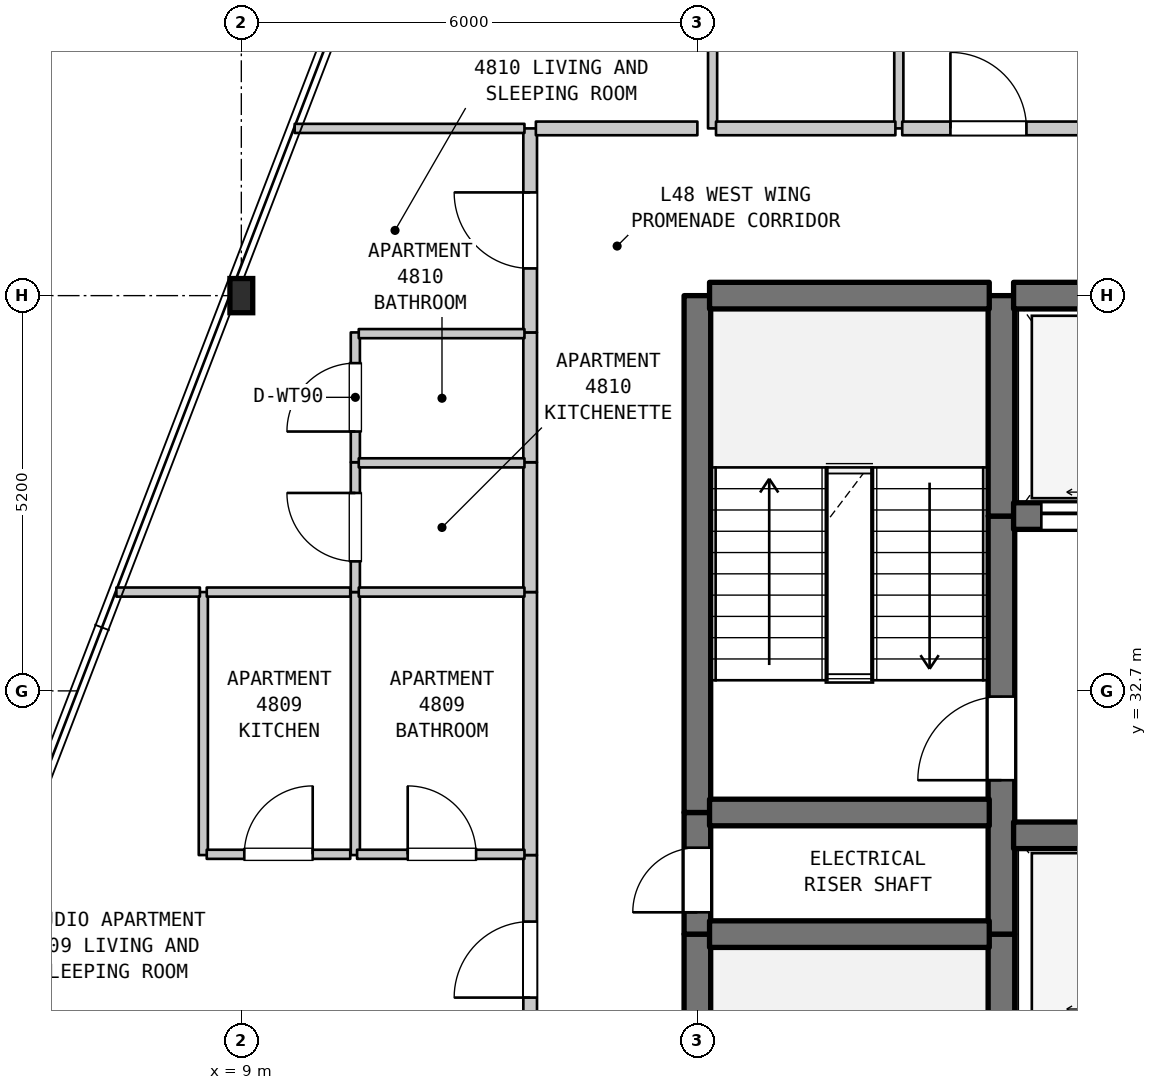
"""IFC4 building model, lengths in metres.
Left out: names, types, materials, properties, quantities, classifications, styles, units other than length and angle.
Written with IfcOpenShell. Run it as: python <this file> out.ifc"""

import sys

from ifc_helpers import new_model, si_unit, direction, frame, frame_2d, origin, origin_2d, place, context, subcontext, project, spatial, rectangle, i_section, extrude, element, fill, save


model = new_model("IFC4")
c1 = context("Model", 3, precision=1e-05, world=origin(), true_north=direction((0.0, 1.0)))
c2 = subcontext(c1, "Body", "Model", "MODEL_VIEW")
j1 = project(units=[si_unit("LENGTHUNIT", "METRE"), si_unit("PLANEANGLEUNIT", "RADIAN")], contexts=[c1])
p1 = place(None, origin())
s1 = spatial("IfcSite", under=j1, at=p1, CompositionType="ELEMENT")
p2 = place(p1, origin())
s2 = spatial("IfcBuilding", under=s1, at=p2, CompositionType="ELEMENT")
p3 = place(p2, frame((0.0, 0.0, 195.8)))
s3 = spatial("IfcBuildingStorey", under=s2, at=p3, CompositionType="ELEMENT", Elevation=195.8)
p4 = place(p3, frame((9.0, 37.9, 0.0), z_axis=(0.0, 0.0, 1.0), x_axis=(1.0, 0.0, 0.0)))
e1 = element("IfcColumn", 1, at=p4, inside=s3, PredefinedType="COLUMN", context=c2, shape_type="SweptSolid", body=[
    extrude(i_section(OverallWidth=0.3, OverallDepth=0.45, WebThickness=0.014, FlangeThickness=0.026, FilletRadius=0.027, at=origin_2d()), origin(), (0.0, 0.0, 1.0), 3.7),
])
for number, where, z_axis, x_axis in (
    (2, (8.5, 30.54, 0.0), (0.0, 0.0, 1.0), (0.0, 1.0, 0.0)),
    (3, (10.5, 30.54, 0.0), (0.0, 0.0, 1.0), (0.0, 1.0, 0.0)),
):
    element("IfcWall", number, at=place(p3, frame(where, z_axis=z_axis, x_axis=x_axis)), inside=s3, PredefinedType="PARTITIONING", context=c2, shape_type="SweptSolid", body=[
        extrude(rectangle(XDim=3.46, YDim=0.12, at=frame_2d((1.73, 0.0))), origin(), (0.0, 0.0, 1.0), 3.39),
    ])
p5 = place(p3, frame((10.5, 34.0, 0.0), z_axis=(0.0, 0.0, 1.0), x_axis=(0.0, 1.0, 0.0)))
e4 = element("IfcWall", 4, at=p5, inside=s3, PredefinedType="PARTITIONING", context=c2, shape_type="SweptSolid", body=[
    extrude(rectangle(XDim=1.708, YDim=0.12, at=frame_2d((0.854, 0.0))), origin(), (0.0, 0.0, 1.0), 3.39),
])
p6 = place(p5, frame((0.404, 0.0, 0.0)))
e5 = element("IfcOpeningElement", 5, at=p6, cuts=e4, PredefinedType="OPENING", context=c2, shape_type="SweptSolid", body=[
    extrude(rectangle(XDim=0.9, YDim=2.15, at=frame_2d((0.45, 1.075))), frame((0.0, 0.07, 0.0), z_axis=(0.0, -1.0, 0.0), x_axis=(1.0, 0.0, 0.0)), (0.0, 0.0, 1.0), 0.14),
])
p7 = place(p3, frame((10.5, 35.708, 0.0), z_axis=(0.0, 0.0, 1.0), x_axis=(0.0, 1.0, 0.0)))
e6 = element("IfcWall", 6, at=p7, inside=s3, PredefinedType="PARTITIONING", context=c2, shape_type="SweptSolid", body=[
    extrude(rectangle(XDim=1.708, YDim=0.12, at=frame_2d((0.854, 0.0))), origin(), (0.0, 0.0, 1.0), 3.39),
])
p8 = place(p7, frame((0.404, 0.0, 0.0)))
e7 = element("IfcOpeningElement", 7, at=p8, cuts=e6, PredefinedType="OPENING", context=c2, shape_type="SweptSolid", body=[
    extrude(rectangle(XDim=0.9, YDim=2.1, at=frame_2d((0.45, 1.05))), frame((0.0, 0.07, 0.0), z_axis=(0.0, -1.0, 0.0), x_axis=(1.0, 0.0, 0.0)), (0.0, 0.0, 1.0), 0.14),
])
p9 = place(p3, frame((12.8, 27.79, 0.0), z_axis=(0.0, 0.0, 1.0), x_axis=(0.0, 1.0, 0.0)))
e8 = element("IfcWall", 8, at=p9, inside=s3, PredefinedType="STANDARD", context=c2, shape_type="SweptSolid", body=[
    extrude(rectangle(XDim=2.75, YDim=0.18, at=frame_2d((1.375, 0.0))), origin(), (0.0, 0.0, 1.0), 3.39),
])
p10 = place(p9, frame((0.875, 0.0, 0.0)))
e9 = element("IfcOpeningElement", 9, at=p10, cuts=e8, PredefinedType="OPENING", context=c2, shape_type="SweptSolid", body=[
    extrude(rectangle(XDim=1.0, YDim=2.15, at=frame_2d((0.5, 1.075))), frame((0.0, 0.1, 0.0), z_axis=(0.0, -1.0, 0.0), x_axis=(1.0, 0.0, 0.0)), (0.0, 0.0, 1.0), 0.2),
])
p11 = place(p3, frame((12.8, 30.54, 0.0), z_axis=(0.0, 0.0, 1.0), x_axis=(0.0, 1.0, 0.0)))
e10 = element("IfcWall", 10, at=p11, inside=s3, PredefinedType="STANDARD", context=c2, shape_type="SweptSolid", body=[
    extrude(rectangle(XDim=3.46, YDim=0.18, at=frame_2d((1.73, 0.0))), origin(), (0.0, 0.0, 1.0), 3.39),
])
for number, where, z_axis, x_axis in (
    (11, (12.8, 34.0, 0.0), (0.0, 0.0, 1.0), (0.0, 1.0, 0.0)),
    (12, (12.8, 35.708, 0.0), (0.0, 0.0, 1.0), (0.0, 1.0, 0.0)),
):
    element("IfcWall", number, at=place(p3, frame(where, z_axis=z_axis, x_axis=x_axis)), inside=s3, PredefinedType="STANDARD", context=c2, shape_type="SweptSolid", body=[
        extrude(rectangle(XDim=1.708, YDim=0.18, at=frame_2d((0.854, 0.0))), origin(), (0.0, 0.0, 1.0), 3.39),
    ])
p12 = place(p3, frame((12.8, 37.416, 0.0), z_axis=(0.0, 0.0, 1.0), x_axis=(0.0, 1.0, 0.0)))
e13 = element("IfcWall", 13, at=p12, inside=s3, PredefinedType="STANDARD", context=c2, shape_type="SweptSolid", body=[
    extrude(rectangle(XDim=2.684, YDim=0.18, at=frame_2d((1.342, 0.0))), origin(), (0.0, 0.0, 1.0), 3.39),
])
p13 = place(p12, frame((0.842, 0.0, 0.0)))
e14 = element("IfcOpeningElement", 14, at=p13, cuts=e13, PredefinedType="OPENING", context=c2, shape_type="SweptSolid", body=[
    extrude(rectangle(XDim=1.0, YDim=2.15, at=frame_2d((0.5, 1.075))), frame((0.0, 0.1, 0.0), z_axis=(0.0, -1.0, 0.0), x_axis=(1.0, 0.0, 0.0)), (0.0, 0.0, 1.0), 0.2),
])
p14 = place(p3, frame((15.0, 22.7, 0.0), z_axis=(0.0, 0.0, 1.0), x_axis=(0.0, 1.0, 0.0)))
e15 = element("IfcWall", 15, at=p14, inside=s3, PredefinedType="SHEAR", context=c2, shape_type="SweptSolid", body=[
    extrude(rectangle(XDim=6.8, YDim=0.35, at=frame_2d((3.4, 0.0))), origin(), (0.0, 0.0, 1.0), 3.39),
])
p15 = place(p3, frame((15.0, 29.5, 0.0), z_axis=(0.0, 0.0, 1.0), x_axis=(0.0, 1.0, 0.0)))
e16 = element("IfcWall", 16, at=p15, inside=s3, PredefinedType="SHEAR", context=c2, shape_type="SweptSolid", body=[
    extrude(rectangle(XDim=1.6, YDim=0.35, at=frame_2d((0.8, 0.0))), origin(), (0.0, 0.0, 1.0), 3.39),
])
p16 = place(p15, frame((0.287, 0.0, 0.0)))
e17 = element("IfcOpeningElement", 17, at=p16, cuts=e16, PredefinedType="OPENING", context=c2, shape_type="SweptSolid", body=[
    extrude(rectangle(XDim=0.85, YDim=2.1, at=frame_2d((0.425, 1.05))), frame((0.0, 0.185, 0.0), z_axis=(0.0, -1.0, 0.0), x_axis=(1.0, 0.0, 0.0)), (0.0, 0.0, 1.0), 0.37),
])
p17 = place(p3, frame((15.0, 31.1, 0.0), z_axis=(0.0, 0.0, 1.0), x_axis=(0.0, 1.0, 0.0)))
e18 = element("IfcWall", 18, at=p17, inside=s3, PredefinedType="SHEAR", context=c2, shape_type="SweptSolid", body=[
    extrude(rectangle(XDim=6.8, YDim=0.35, at=frame_2d((3.4, 0.0))), origin(), (0.0, 0.0, 1.0), 3.39),
])
p18 = place(p3, frame((15.2, 40.1, 0.0), z_axis=(0.0, 0.0, 1.0), x_axis=(0.0, 1.0, 0.0)))
e19 = element("IfcWall", 19, at=p18, inside=s3, PredefinedType="PARTITIONING", context=c2, shape_type="SweptSolid", body=[
    extrude(rectangle(XDim=3.2, YDim=0.12, at=frame_2d((1.6, 0.0))), origin(), (0.0, 0.0, 1.0), 3.39),
])
p19 = place(p3, frame((17.65, 40.1, 0.0), z_axis=(0.0, 0.0, 1.0), x_axis=(0.0, 1.0, 0.0)))
e20 = element("IfcWall", 20, at=p19, inside=s3, PredefinedType="PARTITIONING", context=c2, shape_type="SweptSolid", body=[
    extrude(rectangle(XDim=3.2, YDim=0.12, at=frame_2d((1.6, 0.0))), origin(), (0.0, 0.0, 1.0), 3.39),
])
p20 = place(p19, frame((1.15, 0.0, 0.0)))
e21 = element("IfcOpeningElement", 21, at=p20, cuts=e20, PredefinedType="OPENING", context=c2, shape_type="SweptSolid", body=[
    extrude(rectangle(XDim=0.9, YDim=2.15, at=frame_2d((0.45, 1.075))), frame((0.0, 0.07, 0.0), z_axis=(0.0, -1.0, 0.0), x_axis=(1.0, 0.0, 0.0)), (0.0, 0.0, 1.0), 0.14),
])
p21 = place(p3, frame((19.0, 28.2, 0.0), z_axis=(0.0, 0.0, 1.0), x_axis=(0.0, 1.0, 0.0)))
e22 = element("IfcWall", 22, at=p21, inside=s3, PredefinedType="SHEAR", context=c2, shape_type="SweptSolid", body=[
    extrude(rectangle(XDim=1.3, YDim=0.35, at=frame_2d((0.65, 0.0))), origin(), (0.0, 0.0, 1.0), 3.39),
])
p22 = place(p3, frame((19.0, 29.5, 0.0), z_axis=(0.0, 0.0, 1.0), x_axis=(0.0, 1.0, 0.0)))
e23 = element("IfcWall", 23, at=p22, inside=s3, PredefinedType="SHEAR", context=c2, shape_type="SweptSolid", body=[
    extrude(rectangle(XDim=5.5, YDim=0.35, at=frame_2d((2.75, 0.0))), origin(), (0.0, 0.0, 1.0), 3.39),
])
p23 = place(p22, frame((2.025, 0.0, 0.0)))
e24 = element("IfcOpeningElement", 24, at=p23, cuts=e23, PredefinedType="OPENING", context=c2, shape_type="SweptSolid", body=[
    extrude(rectangle(XDim=1.1, YDim=2.15, at=frame_2d((0.55, 1.075))), frame((0.0, 0.185, 0.0), z_axis=(0.0, -1.0, 0.0), x_axis=(1.0, 0.0, 0.0)), (0.0, 0.0, 1.0), 0.37),
])
p24 = place(p3, frame((19.0, 35.0, 0.0), z_axis=(0.0, 0.0, 1.0), x_axis=(0.0, 1.0, 0.0)))
e25 = element("IfcWall", 25, at=p24, inside=s3, PredefinedType="SHEAR", context=c2, shape_type="SweptSolid", body=[
    extrude(rectangle(XDim=2.9, YDim=0.35, at=frame_2d((1.45, 0.0))), origin(), (0.0, 0.0, 1.0), 3.39),
])
p25 = place(p3, frame((15.16, 29.5, 0.0), z_axis=(0.0, 0.0, 1.0), x_axis=(1.0, 0.0, 0.0)))
e26 = element("IfcWall", 26, at=p25, inside=s3, PredefinedType="SHEAR", context=c2, shape_type="SweptSolid", body=[
    extrude(rectangle(XDim=3.68, YDim=0.35, at=frame_2d((1.84, 0.0))), origin(), (0.0, 0.0, 1.0), 3.39),
])
p26 = place(p3, frame((8.545, 30.55, 0.0), z_axis=(0.0, 0.0, 1.0), x_axis=(1.0, 0.0, 0.0)))
e27 = element("IfcWall", 27, at=p26, inside=s3, PredefinedType="PARTITIONING", context=c2, shape_type="SweptSolid", body=[
    extrude(rectangle(XDim=1.888, YDim=0.12, at=frame_2d((0.944, 0.0))), origin(), (0.0, 0.0, 1.0), 3.39),
])
p27 = place(p26, frame((0.494, 0.0, 0.0)))
e28 = element("IfcOpeningElement", 28, at=p27, cuts=e27, PredefinedType="OPENING", context=c2, shape_type="SweptSolid", body=[
    extrude(rectangle(XDim=0.9, YDim=2.15, at=frame_2d((0.45, 1.075))), frame((0.0, 0.07, 0.0), z_axis=(0.0, -1.0, 0.0), x_axis=(1.0, 0.0, 0.0)), (0.0, 0.0, 1.0), 0.14),
])
p28 = place(p3, frame((10.523, 30.55, 0.0), z_axis=(0.0, 0.0, 1.0), x_axis=(1.0, 0.0, 0.0)))
e29 = element("IfcWall", 29, at=p28, inside=s3, PredefinedType="PARTITIONING", context=c2, shape_type="SweptSolid", body=[
    extrude(rectangle(XDim=2.202, YDim=0.12, at=frame_2d((1.101, 0.0))), origin(), (0.0, 0.0, 1.0), 3.39),
])
p29 = place(p28, frame((0.666, 0.0, 0.0)))
e30 = element("IfcOpeningElement", 30, at=p29, cuts=e29, PredefinedType="OPENING", context=c2, shape_type="SweptSolid", body=[
    extrude(rectangle(XDim=0.9, YDim=2.1, at=frame_2d((0.45, 1.05))), frame((0.0, 0.07, 0.0), z_axis=(0.0, -1.0, 0.0), x_axis=(1.0, 0.0, 0.0)), (0.0, 0.0, 1.0), 0.14),
])
p30 = place(p3, frame((19.16, 30.8, 0.0), z_axis=(0.0, 0.0, 1.0), x_axis=(1.0, 0.0, 0.0)))
e31 = element("IfcWall", 31, at=p30, inside=s3, PredefinedType="SHEAR", context=c2, shape_type="SweptSolid", body=[
    extrude(rectangle(XDim=4.48, YDim=0.35, at=frame_2d((2.24, 0.0))), origin(), (0.0, 0.0, 1.0), 3.39),
])
p31 = place(p3, frame((15.16, 31.1, 0.0), z_axis=(0.0, 0.0, 1.0), x_axis=(1.0, 0.0, 0.0)))
e32 = element("IfcWall", 32, at=p31, inside=s3, PredefinedType="SHEAR", context=c2, shape_type="SweptSolid", body=[
    extrude(rectangle(XDim=3.68, YDim=0.35, at=frame_2d((1.84, 0.0))), origin(), (0.0, 0.0, 1.0), 3.39),
])
p32 = place(p3, frame((7.356, 34.0, 0.0), z_axis=(0.0, 0.0, 1.0), x_axis=(1.0, 0.0, 0.0)))
e33 = element("IfcWall", 33, at=p32, inside=s3, PredefinedType="PARTITIONING", context=c2, shape_type="SweptSolid", body=[
    extrude(rectangle(XDim=1.099, YDim=0.12, at=frame_2d((0.55, 0.0))), origin(), (0.0, 0.0, 1.0), 3.39),
])
p33 = place(p3, frame((8.545, 34.0, 0.0), z_axis=(0.0, 0.0, 1.0), x_axis=(1.0, 0.0, 0.0)))
e34 = element("IfcWall", 34, at=p33, inside=s3, PredefinedType="PARTITIONING", context=c2, shape_type="SweptSolid", body=[
    extrude(rectangle(XDim=1.888, YDim=0.12, at=frame_2d((0.944, 0.0))), origin(), (0.0, 0.0, 1.0), 3.39),
])
p34 = place(p3, frame((10.545, 34.0, 0.0), z_axis=(0.0, 0.0, 1.0), x_axis=(1.0, 0.0, 0.0)))
e35 = element("IfcWall", 35, at=p34, inside=s3, PredefinedType="PARTITIONING", context=c2, shape_type="SweptSolid", body=[
    extrude(rectangle(XDim=2.18, YDim=0.12, at=frame_2d((1.09, 0.0))), origin(), (0.0, 0.0, 1.0), 3.39),
])
p35 = place(p3, frame((19.16, 35.0, 0.0), z_axis=(0.0, 0.0, 1.0), x_axis=(1.0, 0.0, 0.0)))
e36 = element("IfcWall", 36, at=p35, inside=s3, PredefinedType="SHEAR", context=c2, shape_type="SweptSolid", body=[
    extrude(rectangle(XDim=4.48, YDim=0.35, at=frame_2d((2.24, 0.0))), origin(), (0.0, 0.0, 1.0), 3.39),
])
p36 = place(p35, frame((0.365, 0.0, 0.0)))
e37 = element("IfcOpeningElement", 37, at=p36, cuts=e36, PredefinedType="OPENING", context=c2, shape_type="SweptSolid", body=[
    extrude(rectangle(XDim=1.35, YDim=2.2, at=frame_2d((0.675, 1.1))), frame((0.0, 0.185, 0.0), z_axis=(0.0, -1.0, 0.0), x_axis=(1.0, 0.0, 0.0)), (0.0, 0.0, 1.0), 0.37),
])
p37 = place(p35, frame((2.765, 0.0, 0.0)))
e38 = element("IfcOpeningElement", 38, at=p37, cuts=e36, PredefinedType="OPENING", context=c2, shape_type="SweptSolid", body=[
    extrude(rectangle(XDim=1.35, YDim=2.2, at=frame_2d((0.675, 1.1))), frame((0.0, 0.185, 0.0), z_axis=(0.0, -1.0, 0.0), x_axis=(1.0, 0.0, 0.0)), (0.0, 0.0, 1.0), 0.37),
])
for number, where, z_axis, x_axis in (
    (39, (10.545, 35.7, 0.0), (0.0, 0.0, 1.0), (1.0, 0.0, 0.0)),
    (40, (10.545, 37.4, 0.0), (0.0, 0.0, 1.0), (1.0, 0.0, 0.0)),
):
    element("IfcWall", number, at=place(p3, frame(where, z_axis=z_axis, x_axis=x_axis)), inside=s3, PredefinedType="PARTITIONING", context=c2, shape_type="SweptSolid", body=[
        extrude(rectangle(XDim=2.18, YDim=0.12, at=frame_2d((1.09, 0.0))), origin(), (0.0, 0.0, 1.0), 3.39),
    ])
p38 = place(p3, frame((15.16, 37.9, 0.0), z_axis=(0.0, 0.0, 1.0), x_axis=(1.0, 0.0, 0.0)))
e41 = element("IfcWall", 41, at=p38, inside=s3, PredefinedType="SHEAR", context=c2, shape_type="SweptSolid", body=[
    extrude(rectangle(XDim=3.68, YDim=0.35, at=frame_2d((1.84, 0.0))), origin(), (0.0, 0.0, 1.0), 3.39),
])
p39 = place(p3, frame((19.16, 37.9, 0.0), z_axis=(0.0, 0.0, 1.0), x_axis=(1.0, 0.0, 0.0)))
e42 = element("IfcWall", 42, at=p39, inside=s3, PredefinedType="SHEAR", context=c2, shape_type="SweptSolid", body=[
    extrude(rectangle(XDim=4.48, YDim=0.35, at=frame_2d((2.24, 0.0))), origin(), (0.0, 0.0, 1.0), 3.39),
])
p40 = place(p3, frame((9.702, 40.1, 0.0), z_axis=(0.0, 0.0, 1.0), x_axis=(1.0, 0.0, 0.0)))
e43 = element("IfcWall", 43, at=p40, inside=s3, PredefinedType="PARTITIONING", context=c2, shape_type="SweptSolid", body=[
    extrude(rectangle(XDim=3.023, YDim=0.12, at=frame_2d((1.512, 0.0))), origin(), (0.0, 0.0, 1.0), 3.39),
])
p41 = place(p3, frame((12.875, 40.1, 0.0), z_axis=(0.0, 0.0, 1.0), x_axis=(1.0, 0.0, 0.0)))
e44 = element("IfcWall", 44, at=p41, inside=s3, PredefinedType="STANDARD", context=c2, shape_type="SweptSolid", body=[
    extrude(rectangle(XDim=2.125, YDim=0.18, at=frame_2d((1.062, 0.0))), origin(), (0.0, 0.0, 1.0), 3.39),
])
p42 = place(p3, frame((15.245, 40.1, 0.0), z_axis=(0.0, 0.0, 1.0), x_axis=(1.0, 0.0, 0.0)))
e45 = element("IfcWall", 45, at=p42, inside=s3, PredefinedType="STANDARD", context=c2, shape_type="SweptSolid", body=[
    extrude(rectangle(XDim=2.36, YDim=0.18, at=frame_2d((1.18, 0.0))), origin(), (0.0, 0.0, 1.0), 3.39),
])
p43 = place(p3, frame((17.695, 40.1, 0.0), z_axis=(0.0, 0.0, 1.0), x_axis=(1.0, 0.0, 0.0)))
e46 = element("IfcWall", 46, at=p43, inside=s3, PredefinedType="STANDARD", context=c2, shape_type="SweptSolid", body=[
    extrude(rectangle(XDim=2.41, YDim=0.18, at=frame_2d((1.205, 0.0))), origin(), (0.0, 0.0, 1.0), 3.39),
])
p44 = place(p43, frame((0.634, 0.0, 0.0)))
e47 = element("IfcOpeningElement", 47, at=p44, cuts=e46, PredefinedType="OPENING", context=c2, shape_type="SweptSolid", body=[
    extrude(rectangle(XDim=1.0, YDim=2.15, at=frame_2d((0.5, 1.075))), frame((0.0, 0.1, 0.0), z_axis=(0.0, -1.0, 0.0), x_axis=(1.0, 0.0, 0.0)), (0.0, 0.0, 1.0), 0.2),
])
p45 = place(p6, origin())
e48 = element("IfcDoor", 48, at=p45, inside=s3, OperationType="SINGLE_SWING_RIGHT", PredefinedType="DOOR", context=c2, shape_type="SweptSolid", body=[
    extrude(rectangle(XDim=0.9, YDim=2.15, at=frame_2d((0.45, 1.075))), frame((0.0, 0.025, 0.0), z_axis=(0.0, -1.0, 0.0), x_axis=(1.0, 0.0, 0.0)), (0.0, 0.0, 1.0), 0.05),
])
fill(e5, e48)
p46 = place(p8, origin())
e49 = element("IfcDoor", 49, at=p46, inside=s3, OperationType="SINGLE_SWING_LEFT", PredefinedType="DOOR", context=c2, shape_type="SweptSolid", body=[
    extrude(rectangle(XDim=0.9, YDim=2.1, at=frame_2d((0.45, 1.05))), frame((0.0, 0.025, 0.0), z_axis=(0.0, -1.0, 0.0), x_axis=(1.0, 0.0, 0.0)), (0.0, 0.0, 1.0), 0.05),
])
fill(e7, e49)
p47 = place(p10, origin())
e50 = element("IfcDoor", 50, at=p47, inside=s3, OperationType="SINGLE_SWING_LEFT", PredefinedType="DOOR", context=c2, shape_type="SweptSolid", body=[
    extrude(rectangle(XDim=1.0, YDim=2.15, at=frame_2d((0.5, 1.075))), frame((0.0, 0.025, 0.0), z_axis=(0.0, -1.0, 0.0), x_axis=(1.0, 0.0, 0.0)), (0.0, 0.0, 1.0), 0.05),
])
fill(e9, e50)
p48 = place(p13, origin())
e51 = element("IfcDoor", 51, at=p48, inside=s3, OperationType="SINGLE_SWING_RIGHT", PredefinedType="DOOR", context=c2, shape_type="SweptSolid", body=[
    extrude(rectangle(XDim=1.0, YDim=2.15, at=frame_2d((0.5, 1.075))), frame((0.0, 0.025, 0.0), z_axis=(0.0, -1.0, 0.0), x_axis=(1.0, 0.0, 0.0)), (0.0, 0.0, 1.0), 0.05),
])
fill(e14, e51)
p49 = place(p16, origin())
e52 = element("IfcDoor", 52, at=p49, inside=s3, OperationType="SINGLE_SWING_LEFT", PredefinedType="DOOR", context=c2, shape_type="SweptSolid", body=[
    extrude(rectangle(XDim=0.85, YDim=2.1, at=frame_2d((0.425, 1.05))), frame((0.0, 0.025, 0.0), z_axis=(0.0, -1.0, 0.0), x_axis=(1.0, 0.0, 0.0)), (0.0, 0.0, 1.0), 0.05),
])
fill(e17, e52)
p50 = place(p23, origin())
e53 = element("IfcDoor", 53, at=p50, inside=s3, OperationType="SINGLE_SWING_LEFT", PredefinedType="DOOR", context=c2, shape_type="SweptSolid", body=[
    extrude(rectangle(XDim=1.1, YDim=2.15, at=frame_2d((0.55, 1.075))), frame((0.0, 0.025, 0.0), z_axis=(0.0, -1.0, 0.0), x_axis=(1.0, 0.0, 0.0)), (0.0, 0.0, 1.0), 0.05),
])
fill(e24, e53)
p51 = place(p27, origin())
e54 = element("IfcDoor", 54, at=p51, inside=s3, OperationType="SINGLE_SWING_RIGHT", PredefinedType="DOOR", context=c2, shape_type="SweptSolid", body=[
    extrude(rectangle(XDim=0.9, YDim=2.15, at=frame_2d((0.45, 1.075))), frame((0.0, 0.025, 0.0), z_axis=(0.0, -1.0, 0.0), x_axis=(1.0, 0.0, 0.0)), (0.0, 0.0, 1.0), 0.05),
])
fill(e28, e54)
p52 = place(p29, origin())
e55 = element("IfcDoor", 55, at=p52, inside=s3, OperationType="SINGLE_SWING_LEFT", PredefinedType="DOOR", context=c2, shape_type="SweptSolid", body=[
    extrude(rectangle(XDim=0.9, YDim=2.1, at=frame_2d((0.45, 1.05))), frame((0.0, 0.025, 0.0), z_axis=(0.0, -1.0, 0.0), x_axis=(1.0, 0.0, 0.0)), (0.0, 0.0, 1.0), 0.05),
])
fill(e30, e55)
p53 = place(p36, origin())
e56 = element("IfcDoor", 56, at=p53, inside=s3, OperationType="DOUBLE_DOOR_SLIDING", PredefinedType="DOOR", context=c2, shape_type="SweptSolid", body=[
    extrude(rectangle(XDim=1.35, YDim=2.2, at=frame_2d((0.675, 1.1))), frame((0.0, 0.025, 0.0), z_axis=(0.0, -1.0, 0.0), x_axis=(1.0, 0.0, 0.0)), (0.0, 0.0, 1.0), 0.05),
])
fill(e37, e56)
p54 = place(p44, origin())
e57 = element("IfcDoor", 57, at=p54, inside=s3, OperationType="SINGLE_SWING_LEFT", PredefinedType="DOOR", context=c2, shape_type="SweptSolid", body=[
    extrude(rectangle(XDim=1.0, YDim=2.15, at=frame_2d((0.5, 1.075))), frame((0.0, 0.025, 0.0), z_axis=(0.0, -1.0, 0.0), x_axis=(1.0, 0.0, 0.0)), (0.0, 0.0, 1.0), 0.05),
])
fill(e47, e57)
save(model, sys.argv[1])
